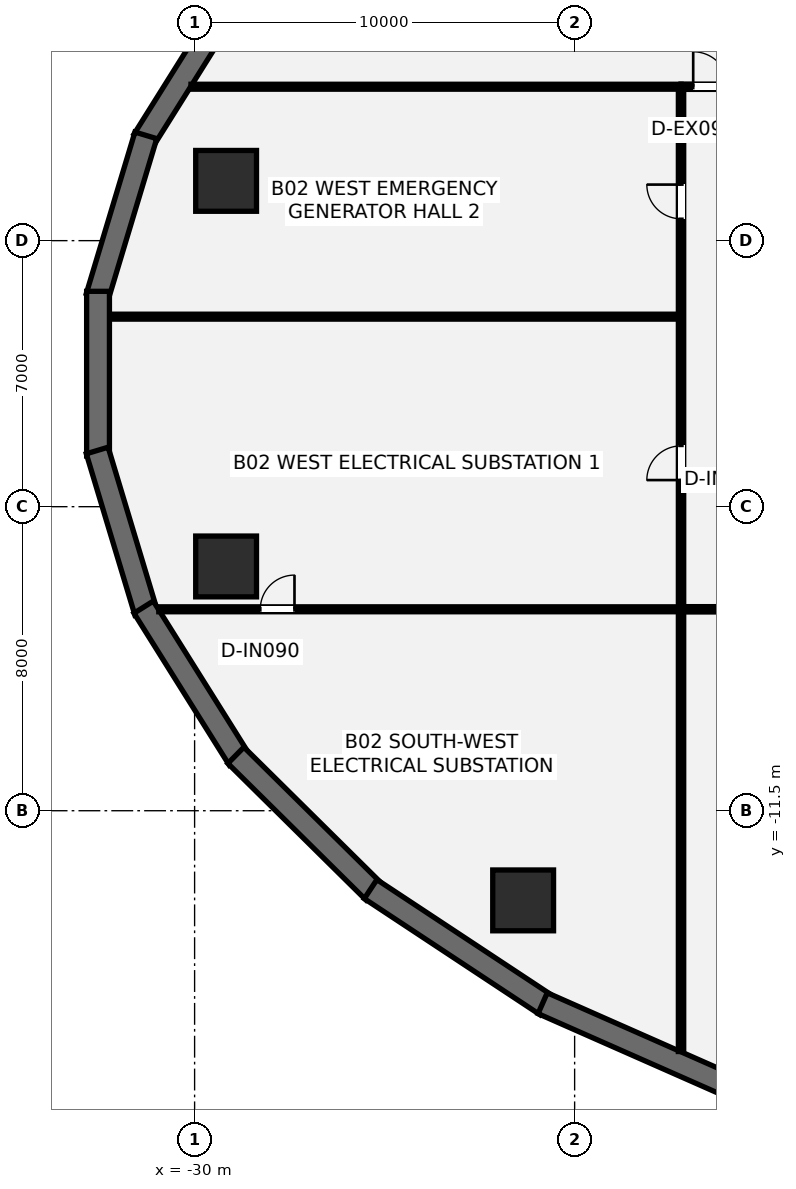
"""IFC4 building model, lengths in metres.
Left out: names, types, materials, properties, quantities, classifications, styles, units other than length and angle.
Written with IfcOpenShell. Run it as: python <this file> out.ifc"""

import sys

from ifc_helpers import new_model, si_unit, direction, frame, frame_2d, origin, origin_2d, place, context, subcontext, project, spatial, rectangle, hollow_circle, extrude, element, fill, save


model = new_model("IFC4")
c1 = context("Model", 3, precision=1e-05, world=origin(), true_north=direction((0.0, 1.0)))
c2 = subcontext(c1, "Body", "Model", "MODEL_VIEW")
j1 = project(units=[si_unit("LENGTHUNIT", "METRE"), si_unit("PLANEANGLEUNIT", "RADIAN")], contexts=[c1])
p1 = place(None, origin())
s1 = spatial("IfcSite", under=j1, at=p1, CompositionType="ELEMENT")
p2 = place(p1, origin())
s2 = spatial("IfcBuilding", under=s1, at=p2, CompositionType="ELEMENT")
p3 = place(p2, frame((0.0, 0.0, -8.8)))
s3 = spatial("IfcBuildingStorey", under=s2, at=p3, CompositionType="ELEMENT", Elevation=-8.8)
p4 = place(p3, frame((-28.833, 10.142, 0.0), z_axis=(0.0, 0.0, 1.0), x_axis=(-0.531244363113, -0.847218641592, 0.0)))
e1 = element("IfcWall", 1, at=p4, inside=s3, PredefinedType="USERDEFINED", context=c2, shape_type="SweptSolid", body=[
    extrude(rectangle(XDim=4.72, YDim=0.6, at=frame_2d((2.36, 0.0))), origin(), (0.0, 0.0, 1.0), 4.4),
])
p5 = place(p3, frame((-31.283, 6.271, 0.0), z_axis=(0.0, 0.0, 1.0), x_axis=(-0.288296686647, -0.95754113252, 0.0)))
e2 = element("IfcWall", 2, at=p5, inside=s3, PredefinedType="USERDEFINED", context=c2, shape_type="SweptSolid", body=[
    extrude(rectangle(XDim=4.438, YDim=0.6, at=frame_2d((2.219, 0.0))), origin(), (0.0, 0.0, 1.0), 4.4),
])
p6 = place(p3, frame((-32.541, 2.167, 0.0), z_axis=(0.0, 0.0, 1.0), x_axis=(0.0, -1.0, 0.0)))
e3 = element("IfcWall", 3, at=p6, inside=s3, PredefinedType="USERDEFINED", context=c2, shape_type="SweptSolid", body=[
    extrude(rectangle(XDim=4.333, YDim=0.6, at=frame_2d((2.167, 0.0))), origin(), (0.0, 0.0, 1.0), 4.4),
])
p7 = place(p3, frame((-32.562, -2.021, 0.0), z_axis=(0.0, 0.0, 1.0), x_axis=(0.288296686647, -0.95754113252, 0.0)))
e4 = element("IfcWall", 4, at=p7, inside=s3, PredefinedType="USERDEFINED", context=c2, shape_type="SweptSolid", body=[
    extrude(rectangle(XDim=4.438, YDim=0.6, at=frame_2d((2.219, 0.0))), origin(), (0.0, 0.0, 1.0), 4.4),
])
p8 = place(p3, frame((-31.341, -6.143, 0.0), z_axis=(0.0, 0.0, 1.0), x_axis=(0.531244363113, -0.847218641592, 0.0)))
e5 = element("IfcWall", 5, at=p8, inside=s3, PredefinedType="USERDEFINED", context=c2, shape_type="SweptSolid", body=[
    extrude(rectangle(XDim=4.72, YDim=0.6, at=frame_2d((2.36, 0.0))), origin(), (0.0, 0.0, 1.0), 4.4),
])
p9 = place(p3, frame((-28.914, -10.042, 0.0), z_axis=(0.0, 0.0, 1.0), x_axis=(0.711105403666, -0.70308541791, 0.0)))
e6 = element("IfcWall", 6, at=p9, inside=s3, PredefinedType="USERDEFINED", context=c2, shape_type="SweptSolid", body=[
    extrude(rectangle(XDim=5.114, YDim=0.6, at=frame_2d((2.557, 0.0))), origin(), (0.0, 0.0, 1.0), 4.4),
])
p10 = place(p3, frame((-25.369, -13.563, 0.0), z_axis=(0.0, 0.0, 1.0), x_axis=(0.834367518908, -0.551208529861, 0.0)))
e7 = element("IfcWall", 7, at=p10, inside=s3, PredefinedType="USERDEFINED", context=c2, shape_type="SweptSolid", body=[
    extrude(rectangle(XDim=5.542, YDim=0.6, at=frame_2d((2.771, 0.0))), origin(), (0.0, 0.0, 1.0), 4.4),
])
p11 = place(p3, frame((-20.841, -16.565, 0.0), z_axis=(0.0, 0.0, 1.0), x_axis=(0.91483072277, -0.403837527574, 0.0)))
e8 = element("IfcWall", 8, at=p11, inside=s3, PredefinedType="USERDEFINED", context=c2, shape_type="SweptSolid", body=[
    extrude(rectangle(XDim=5.94, YDim=0.6, at=frame_2d((2.97, 0.0))), origin(), (0.0, 0.0, 1.0), 4.4),
])
for number, where, z_axis, x_axis in (
    (9, (-29.171, 5.073, 0.0), (0.0, 0.0, 1.0), (1.0, 0.0, 0.0)),
    (10, (-29.171, -5.073, 0.0), (0.0, 0.0, 1.0), (1.0, 0.0, 0.0)),
    (11, (-21.354, -13.859, 0.0), (0.0, 0.0, 1.0), (1.0, 0.0, 0.0)),
):
    element("IfcColumn", number, at=place(p3, frame(where, z_axis=z_axis, x_axis=x_axis)), inside=s3, PredefinedType="USERDEFINED", context=c2, shape_type="SweptSolid", body=[
        extrude(hollow_circle(Radius=0.8, WallThickness=0.06, at=origin_2d()), origin(), (0.0, 0.0, 1.0), 4.4),
    ])
p12 = place(p3, frame((-17.2, -6.2, 0.0), z_axis=(0.0, 0.0, 1.0), x_axis=(1.0, 0.0, 0.0)))
e12 = element("IfcWall", 12, at=p12, inside=s3, PredefinedType="PARTITIONING", context=c2, shape_type="SweptSolid", body=[
    extrude(rectangle(XDim=34.4, YDim=0.14, at=frame_2d((17.2, 0.0))), origin(), (0.0, 0.0, 1.0), 4.14),
])
p13 = place(p12, frame((5.15, 0.0, 0.0)))
e13 = element("IfcOpeningElement", 13, at=p13, cuts=e12, PredefinedType="OPENING", context=c2, shape_type="SweptSolid", body=[
    extrude(rectangle(XDim=0.9, YDim=2.1, at=frame_2d((0.45, 1.05))), frame((0.0, 0.08, 0.0), z_axis=(0.0, -1.0, 0.0), x_axis=(1.0, 0.0, 0.0)), (0.0, 0.0, 1.0), 0.16),
])
p14 = place(p12, frame((16.75, 0.0, 0.0)))
e14 = element("IfcOpeningElement", 14, at=p14, cuts=e12, PredefinedType="OPENING", context=c2, shape_type="SweptSolid", body=[
    extrude(rectangle(XDim=0.9, YDim=2.1, at=frame_2d((0.45, 1.05))), frame((0.0, 0.08, 0.0), z_axis=(0.0, -1.0, 0.0), x_axis=(1.0, 0.0, 0.0)), (0.0, 0.0, 1.0), 0.16),
])
p15 = place(p12, frame((28.35, 0.0, 0.0)))
e15 = element("IfcOpeningElement", 15, at=p15, cuts=e12, PredefinedType="OPENING", context=c2, shape_type="SweptSolid", body=[
    extrude(rectangle(XDim=0.9, YDim=2.1, at=frame_2d((0.45, 1.05))), frame((0.0, 0.08, 0.0), z_axis=(0.0, -1.0, 0.0), x_axis=(1.0, 0.0, 0.0)), (0.0, 0.0, 1.0), 0.16),
])
p16 = place(p3, frame((-17.2, -17.836, 0.0), z_axis=(0.0, 0.0, 1.0), x_axis=(0.0, 1.0, 0.0)))
e16 = element("IfcWall", 16, at=p16, inside=s3, PredefinedType="PARTITIONING", context=c2, shape_type="SweptSolid", body=[
    extrude(rectangle(XDim=25.386, YDim=0.14, at=frame_2d((12.693, 0.0))), origin(), (0.0, 0.0, 1.0), 3.508),
])
p17 = place(p16, frame((15.036, 0.0, 0.0)))
e17 = element("IfcOpeningElement", 17, at=p17, cuts=e16, PredefinedType="OPENING", context=c2, shape_type="SweptSolid", body=[
    extrude(rectangle(XDim=0.9, YDim=2.1, at=frame_2d((0.45, 1.05))), frame((0.0, 0.08, 0.0), z_axis=(0.0, -1.0, 0.0), x_axis=(1.0, 0.0, 0.0)), (0.0, 0.0, 1.0), 0.16),
])
p18 = place(p16, frame((21.911, 0.0, 0.0)))
e18 = element("IfcOpeningElement", 18, at=p18, cuts=e16, PredefinedType="OPENING", context=c2, shape_type="SweptSolid", body=[
    extrude(rectangle(XDim=0.9, YDim=2.1, at=frame_2d((0.45, 1.05))), frame((0.0, 0.08, 0.0), z_axis=(0.0, -1.0, 0.0), x_axis=(1.0, 0.0, 0.0)), (0.0, 0.0, 1.0), 0.16),
])
p19 = place(p3, frame((-17.2, 7.55, 0.0), z_axis=(0.0, 0.0, 1.0), x_axis=(1.0, 0.0, 0.0)))
e19 = element("IfcWall", 19, at=p19, inside=s3, PredefinedType="PARTITIONING", context=c2, shape_type="SweptSolid", body=[
    extrude(rectangle(XDim=3.15, YDim=0.14, at=frame_2d((1.575, 0.0))), origin(), (0.0, 0.0, 1.0), 4.14),
])
p20 = place(p19, frame((0.32, 0.0, 0.0)))
e20 = element("IfcOpeningElement", 20, at=p20, cuts=e19, PredefinedType="OPENING", context=c2, shape_type="SweptSolid", body=[
    extrude(rectangle(XDim=0.92, YDim=2.15, at=frame_2d((0.46, 1.075))), frame((0.0, 0.08, 0.0), z_axis=(0.0, -1.0, 0.0), x_axis=(1.0, 0.0, 0.0)), (0.0, 0.0, 1.0), 0.16),
])
p21 = place(p3, frame((-30.095, 7.55, 0.0), z_axis=(0.0, 0.0, 1.0), x_axis=(1.0, 0.0, 0.0)))
e21 = element("IfcWall", 21, at=p21, inside=s3, PredefinedType="PARTITIONING", context=c2, shape_type="SweptSolid", body=[
    extrude(rectangle(XDim=12.895, YDim=0.13, at=frame_2d((6.448, 0.0))), origin(), (0.0, 0.0, 1.0), 3.118),
])
p22 = place(p3, frame((-30.942, -6.2, 0.0), z_axis=(0.0, 0.0, 1.0), x_axis=(1.0, 0.0, 0.0)))
e22 = element("IfcWall", 22, at=p22, inside=s3, PredefinedType="PARTITIONING", context=c2, shape_type="SweptSolid", body=[
    extrude(rectangle(XDim=13.742, YDim=0.13, at=frame_2d((6.871, 0.0))), origin(), (0.0, 0.0, 1.0), 3.118),
])
p23 = place(p22, frame((2.67, 0.0, 0.0)))
e23 = element("IfcOpeningElement", 23, at=p23, cuts=e22, PredefinedType="OPENING", context=c2, shape_type="SweptSolid", body=[
    extrude(rectangle(XDim=0.9, YDim=2.1, at=frame_2d((0.45, 1.05))), frame((0.0, 0.075, 0.0), z_axis=(0.0, -1.0, 0.0), x_axis=(1.0, 0.0, 0.0)), (0.0, 0.0, 1.0), 0.15),
])
p24 = place(p3, frame((-32.233, 1.5, 0.0), z_axis=(0.0, 0.0, 1.0), x_axis=(1.0, 0.0, 0.0)))
e24 = element("IfcWall", 24, at=p24, inside=s3, PredefinedType="PARTITIONING", context=c2, shape_type="SweptSolid", body=[
    extrude(rectangle(XDim=15.033, YDim=0.13, at=frame_2d((7.517, 0.0))), origin(), (0.0, 0.0, 1.0), 4.14),
])
p25 = place(p20, origin())
e25 = element("IfcDoor", 25, at=p25, inside=s3, OperationType="SINGLE_SWING_LEFT", PredefinedType="DOOR", context=c2, shape_type="SweptSolid", body=[
    extrude(rectangle(XDim=0.92, YDim=2.15, at=frame_2d((0.46, 1.075))), frame((0.0, 0.025, 0.0), z_axis=(0.0, -1.0, 0.0), x_axis=(1.0, 0.0, 0.0)), (0.0, 0.0, 1.0), 0.05),
])
fill(e20, e25)
p26 = place(p23, origin())
e26 = element("IfcDoor", 26, at=p26, inside=s3, OperationType="SINGLE_SWING_RIGHT", PredefinedType="DOOR", context=c2, shape_type="SweptSolid", body=[
    extrude(rectangle(XDim=0.9, YDim=2.1, at=frame_2d((0.45, 1.05))), frame((0.0, 0.025, 0.0), z_axis=(0.0, -1.0, 0.0), x_axis=(1.0, 0.0, 0.0)), (0.0, 0.0, 1.0), 0.05),
])
fill(e23, e26)
p27 = place(p17, origin())
e27 = element("IfcDoor", 27, at=p27, inside=s3, OperationType="SINGLE_SWING_LEFT", PredefinedType="DOOR", context=c2, shape_type="SweptSolid", body=[
    extrude(rectangle(XDim=0.9, YDim=2.1, at=frame_2d((0.45, 1.05))), frame((0.0, 0.025, 0.0), z_axis=(0.0, -1.0, 0.0), x_axis=(1.0, 0.0, 0.0)), (0.0, 0.0, 1.0), 0.05),
])
fill(e17, e27)
p28 = place(p18, origin())
e28 = element("IfcDoor", 28, at=p28, inside=s3, OperationType="SINGLE_SWING_RIGHT", PredefinedType="DOOR", context=c2, shape_type="SweptSolid", body=[
    extrude(rectangle(XDim=0.9, YDim=2.1, at=frame_2d((0.45, 1.05))), frame((0.0, 0.025, 0.0), z_axis=(0.0, -1.0, 0.0), x_axis=(1.0, 0.0, 0.0)), (0.0, 0.0, 1.0), 0.05),
])
fill(e18, e28)
save(model, sys.argv[1])
